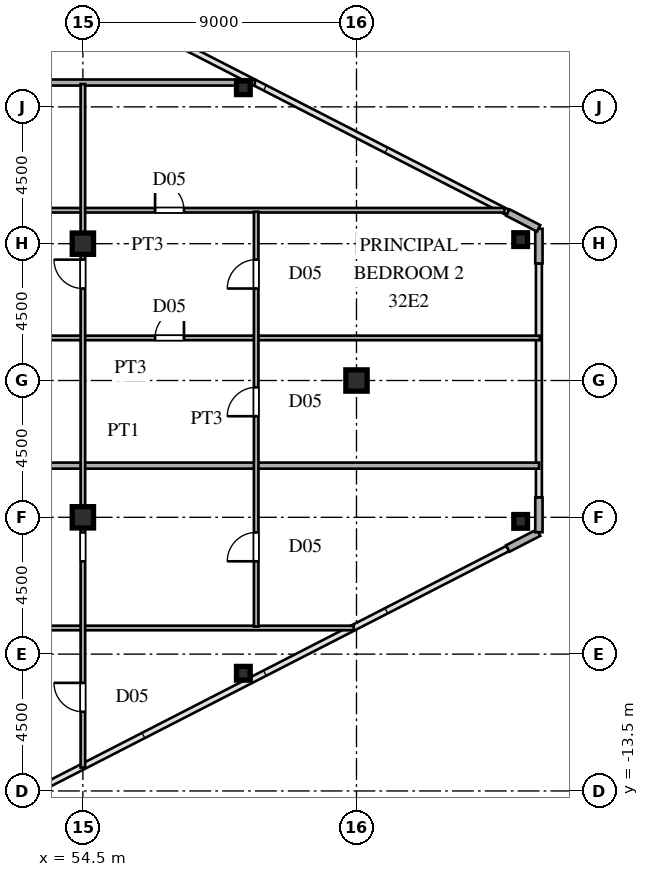
"""IFC4 building model, lengths in metres.
Left out: names, types, materials, properties, quantities, classifications, styles, units other than length and angle.
Written with IfcOpenShell. Run it as: python <this file> out.ifc"""

import sys

from ifc_helpers import new_model, si_unit, direction, frame, frame_2d, origin, origin_2d, place, context, subcontext, project, spatial, rectangle, hollow_rectangle, i_section, extrude, source, transform, mapped, element, fill, save


model = new_model("IFC4")
c1 = context("Model", 3, precision=1e-05, world=origin(), true_north=direction((0.0, 1.0)))
c2 = subcontext(c1, "Body", "Model", "MODEL_VIEW")
j1 = project(units=[si_unit("LENGTHUNIT", "METRE"), si_unit("PLANEANGLEUNIT", "RADIAN")], contexts=[c1])
p1 = place(None, origin())
s1 = spatial("IfcSite", under=j1, at=p1, CompositionType="ELEMENT")
p2 = place(p1, origin())
s2 = spatial("IfcBuilding", under=s1, at=p2, CompositionType="ELEMENT")
p3 = place(p2, frame((0.0, 0.0, 121.2)))
s3 = spatial("IfcBuildingStorey", under=s2, at=p3, CompositionType="ELEMENT", Elevation=121.2)
m1 = source(origin(), c2, "Body", "SweptSolid", [
    extrude(i_section(OverallWidth=0.7, OverallDepth=0.7, WebThickness=0.028, FlangeThickness=0.045, at=origin_2d()), origin(), (0.0, 0.0, 1.0), 3.6),
])
for number, where, z_axis, x_axis in (
    (1, (54.5, -4.5, 0.0), (0.0, 0.0, 1.0), (1.0, 0.0, 0.0)),
    (2, (54.5, 4.5, 0.0), (0.0, 0.0, 1.0), (1.0, 0.0, 0.0)),
    (3, (63.5, 0.0, 0.0), (0.0, 0.0, 1.0), (1.0, 0.0, 0.0)),
):
    element("IfcColumn", number, at=place(p3, frame(where, z_axis=z_axis, x_axis=x_axis)), inside=s3, PredefinedType="COLUMN", context=c2, shape_type="MappedRepresentation", body=[
        mapped(m1, transform((0.0, 0.0, 0.0), scale=1.0)),
    ])
m2 = source(origin(), c2, "Body", "SweptSolid", [
    extrude(hollow_rectangle(XDim=0.45, YDim=0.45, WallThickness=0.018, at=origin_2d()), origin(), (0.0, 0.0, 1.0), 3.6),
])
for number, where, z_axis, x_axis in (
    (4, (68.9, -4.634, 0.0), (0.0, 0.0, 1.0), (1.0, 0.0, 0.0)),
    (5, (68.9, 4.634, 0.0), (0.0, 0.0, 1.0), (1.0, 0.0, 0.0)),
    (6, (59.779, -9.629, 0.0), (0.0, 0.0, 1.0), (1.0, 0.0, 0.0)),
    (7, (59.779, 9.629, 0.0), (0.0, 0.0, 1.0), (1.0, 0.0, 0.0)),
):
    element("IfcColumn", number, at=place(p3, frame(where, z_axis=z_axis, x_axis=x_axis)), inside=s3, PredefinedType="COLUMN", context=c2, shape_type="MappedRepresentation", body=[
        mapped(m2, transform((0.0, 0.0, 0.0), scale=1.0)),
    ])
p4 = place(p3, frame((68.477, -5.525, 0.0), z_axis=(0.0, 0.0, 1.0), x_axis=(0.889797395748, 0.456355776255, 0.0)))
e8 = element("IfcWall", 8, at=p4, inside=s3, PredefinedType="SOLIDWALL", context=c2, shape_type="SweptSolid", body=[
    extrude(rectangle(XDim=1.14, YDim=0.24, at=frame_2d((0.57, 0.0))), origin(), (0.0, 0.0, 1.0), 3.38),
])
for number, where, z_axis, x_axis in (
    (9, (69.5, -4.99, 0.0), (0.0, 0.0, 1.0), (0.0, 1.0, 0.0)),
    (10, (69.5, 3.85, 0.0), (0.0, 0.0, 1.0), (0.0, 1.0, 0.0)),
):
    element("IfcWall", number, at=place(p3, frame(where, z_axis=z_axis, x_axis=x_axis)), inside=s3, PredefinedType="SOLIDWALL", context=c2, shape_type="SweptSolid", body=[
        extrude(rectangle(XDim=1.14, YDim=0.24, at=frame_2d((0.57, 0.0))), origin(), (0.0, 0.0, 1.0), 3.38),
    ])
p5 = place(p3, frame((69.491, 5.005, 0.0), z_axis=(0.0, 0.0, 1.0), x_axis=(-0.889797395748, 0.456355776255, 0.0)))
e11 = element("IfcWall", 11, at=p5, inside=s3, PredefinedType="SOLIDWALL", context=c2, shape_type="SweptSolid", body=[
    extrude(rectangle(XDim=1.14, YDim=0.24, at=frame_2d((0.57, 0.0))), origin(), (0.0, 0.0, 1.0), 3.38),
])
p6 = place(p3, frame((42.6, -8.14, 0.0), z_axis=(0.0, 0.0, 1.0), x_axis=(1.0, 0.0, 0.0)))
e12 = element("IfcWall", 12, at=p6, inside=s3, PredefinedType="PARTITIONING", context=c2, shape_type="SweptSolid", body=[
    extrude(rectangle(XDim=20.81, YDim=0.15, at=frame_2d((10.405, 0.0))), origin(), (0.0, 0.0, 1.0), 3.38),
])
p7 = place(p6, frame((2.462, 0.0, 0.0)))
e13 = element("IfcOpeningElement", 13, at=p7, cuts=e12, PredefinedType="OPENING", context=c2, shape_type="SweptSolid", body=[
    extrude(rectangle(XDim=0.95, YDim=2.15, at=frame_2d((0.475, 1.075))), frame((0.0, 0.085, 0.0), z_axis=(0.0, -1.0, 0.0), x_axis=(1.0, 0.0, 0.0)), (0.0, 0.0, 1.0), 0.17),
])
p8 = place(p6, frame((8.438, 0.0, 0.0)))
e14 = element("IfcOpeningElement", 14, at=p8, cuts=e12, PredefinedType="OPENING", context=c2, shape_type="SweptSolid", body=[
    extrude(rectangle(XDim=0.95, YDim=2.15, at=frame_2d((0.475, 1.075))), frame((0.0, 0.085, 0.0), z_axis=(0.0, -1.0, 0.0), x_axis=(1.0, 0.0, 0.0)), (0.0, 0.0, 1.0), 0.17),
])
p9 = place(p3, frame((39.88, -2.8, 0.0), z_axis=(0.0, 0.0, 1.0), x_axis=(1.0, 0.0, 0.0)))
e15 = element("IfcWall", 15, at=p9, inside=s3, PredefinedType="PARTITIONING", context=c2, shape_type="SweptSolid", body=[
    extrude(rectangle(XDim=29.625, YDim=0.2, at=frame_2d((14.812, 0.0))), origin(), (0.0, 0.0, 1.0), 3.38),
])
p10 = place(p3, frame((42.6, 1.4, 0.0), z_axis=(0.0, 0.0, 1.0), x_axis=(1.0, 0.0, 0.0)))
e16 = element("IfcWall", 16, at=p10, inside=s3, PredefinedType="PARTITIONING", context=c2, shape_type="SweptSolid", body=[
    extrude(rectangle(XDim=26.935, YDim=0.15, at=frame_2d((13.467, 0.0))), origin(), (0.0, 0.0, 1.0), 3.38),
])
p11 = place(p10, frame((5.45, 0.0, 0.0)))
e17 = element("IfcOpeningElement", 17, at=p11, cuts=e16, PredefinedType="OPENING", context=c2, shape_type="SweptSolid", body=[
    extrude(rectangle(XDim=0.95, YDim=2.15, at=frame_2d((0.475, 1.075))), frame((0.0, 0.085, 0.0), z_axis=(0.0, -1.0, 0.0), x_axis=(1.0, 0.0, 0.0)), (0.0, 0.0, 1.0), 0.17),
])
p12 = place(p10, frame((14.275, 0.0, 0.0)))
e18 = element("IfcOpeningElement", 18, at=p12, cuts=e16, PredefinedType="OPENING", context=c2, shape_type="SweptSolid", body=[
    extrude(rectangle(XDim=0.95, YDim=2.15, at=frame_2d((0.475, 1.075))), frame((0.0, 0.085, 0.0), z_axis=(0.0, -1.0, 0.0), x_axis=(1.0, 0.0, 0.0)), (0.0, 0.0, 1.0), 0.17),
])
p13 = place(p3, frame((42.6, 5.6, 0.0), z_axis=(0.0, 0.0, 1.0), x_axis=(1.0, 0.0, 0.0)))
e19 = element("IfcWall", 19, at=p13, inside=s3, PredefinedType="PARTITIONING", context=c2, shape_type="SweptSolid", body=[
    extrude(rectangle(XDim=25.766, YDim=0.15, at=frame_2d((12.883, 0.0))), origin(), (0.0, 0.0, 1.0), 3.38),
])
p14 = place(p13, frame((5.45, 0.0, 0.0)))
e20 = element("IfcOpeningElement", 20, at=p14, cuts=e19, PredefinedType="OPENING", context=c2, shape_type="SweptSolid", body=[
    extrude(rectangle(XDim=0.95, YDim=2.15, at=frame_2d((0.475, 1.075))), frame((0.0, 0.085, 0.0), z_axis=(0.0, -1.0, 0.0), x_axis=(1.0, 0.0, 0.0)), (0.0, 0.0, 1.0), 0.17),
])
p15 = place(p13, frame((14.275, 0.0, 0.0)))
e21 = element("IfcOpeningElement", 21, at=p15, cuts=e19, PredefinedType="OPENING", context=c2, shape_type="SweptSolid", body=[
    extrude(rectangle(XDim=0.95, YDim=2.15, at=frame_2d((0.475, 1.075))), frame((0.0, 0.085, 0.0), z_axis=(0.0, -1.0, 0.0), x_axis=(1.0, 0.0, 0.0)), (0.0, 0.0, 1.0), 0.17),
])
p16 = place(p3, frame((39.88, 9.8, 0.0), z_axis=(0.0, 0.0, 1.0), x_axis=(1.0, 0.0, 0.0)))
e22 = element("IfcWall", 22, at=p16, inside=s3, PredefinedType="PARTITIONING", context=c2, shape_type="SweptSolid", body=[
    extrude(rectangle(XDim=20.277, YDim=0.2, at=frame_2d((10.139, 0.0))), origin(), (0.0, 0.0, 1.0), 3.38),
])
p17 = place(p3, frame((54.5, -12.732, 0.0), z_axis=(0.0, 0.0, 1.0), x_axis=(0.0, 1.0, 0.0)))
e23 = element("IfcWall", 23, at=p17, inside=s3, PredefinedType="PARTITIONING", context=c2, shape_type="SweptSolid", body=[
    extrude(rectangle(XDim=22.482, YDim=0.15, at=frame_2d((11.241, 0.0))), origin(), (0.0, 0.0, 1.0), 2.78),
])
p18 = place(p17, frame((1.837, 0.0, 0.0)))
e24 = element("IfcOpeningElement", 24, at=p18, cuts=e23, PredefinedType="OPENING", context=c2, shape_type="SweptSolid", body=[
    extrude(rectangle(XDim=0.95, YDim=2.15, at=frame_2d((0.475, 1.075))), frame((0.0, 0.085, 0.0), z_axis=(0.0, -1.0, 0.0), x_axis=(1.0, 0.0, 0.0)), (0.0, 0.0, 1.0), 0.17),
])
p19 = place(p17, frame((6.785, 0.0, 0.0)))
e25 = element("IfcOpeningElement", 25, at=p19, cuts=e23, PredefinedType="OPENING", context=c2, shape_type="SweptSolid", body=[
    extrude(rectangle(XDim=0.95, YDim=2.15, at=frame_2d((0.475, 1.075))), frame((0.0, 0.085, 0.0), z_axis=(0.0, -1.0, 0.0), x_axis=(1.0, 0.0, 0.0)), (0.0, 0.0, 1.0), 0.17),
])
p20 = place(p17, frame((15.757, 0.0, 0.0)))
e26 = element("IfcOpeningElement", 26, at=p20, cuts=e23, PredefinedType="OPENING", context=c2, shape_type="SweptSolid", body=[
    extrude(rectangle(XDim=0.95, YDim=2.15, at=frame_2d((0.475, 1.075))), frame((0.0, 0.085, 0.0), z_axis=(0.0, -1.0, 0.0), x_axis=(1.0, 0.0, 0.0)), (0.0, 0.0, 1.0), 0.17),
])
p21 = place(p3, frame((60.2, -8.093, 0.0), z_axis=(0.0, 0.0, 1.0), x_axis=(0.0, 1.0, 0.0)))
e27 = element("IfcWall", 27, at=p21, inside=s3, PredefinedType="PARTITIONING", context=c2, shape_type="SweptSolid", body=[
    extrude(rectangle(XDim=13.643, YDim=0.15, at=frame_2d((6.822, 0.0))), origin(), (0.0, 0.0, 1.0), 3.38),
])
p22 = place(p21, frame((2.146, 0.0, 0.0)))
e28 = element("IfcOpeningElement", 28, at=p22, cuts=e27, PredefinedType="OPENING", context=c2, shape_type="SweptSolid", body=[
    extrude(rectangle(XDim=0.95, YDim=2.15, at=frame_2d((0.475, 1.075))), frame((0.0, 0.085, 0.0), z_axis=(0.0, -1.0, 0.0), x_axis=(1.0, 0.0, 0.0)), (0.0, 0.0, 1.0), 0.17),
])
p23 = place(p21, frame((6.918, 0.0, 0.0)))
e29 = element("IfcOpeningElement", 29, at=p23, cuts=e27, PredefinedType="OPENING", context=c2, shape_type="SweptSolid", body=[
    extrude(rectangle(XDim=0.95, YDim=2.15, at=frame_2d((0.475, 1.075))), frame((0.0, 0.085, 0.0), z_axis=(0.0, -1.0, 0.0), x_axis=(1.0, 0.0, 0.0)), (0.0, 0.0, 1.0), 0.17),
])
p24 = place(p21, frame((11.118, 0.0, 0.0)))
e30 = element("IfcOpeningElement", 30, at=p24, cuts=e27, PredefinedType="OPENING", context=c2, shape_type="SweptSolid", body=[
    extrude(rectangle(XDim=0.95, YDim=2.15, at=frame_2d((0.475, 1.075))), frame((0.0, 0.085, 0.0), z_axis=(0.0, -1.0, 0.0), x_axis=(1.0, 0.0, 0.0)), (0.0, 0.0, 1.0), 0.17),
])
m3 = source(origin(), c2, "Body", "SweptSolid", [
    extrude(rectangle(XDim=0.95, YDim=2.15, at=frame_2d((0.475, 1.075))), frame((0.0, 0.025, 0.0), z_axis=(0.0, -1.0, 0.0), x_axis=(1.0, 0.0, 0.0)), (0.0, 0.0, 1.0), 0.05),
])
p25 = place(p12, origin())
e31 = element("IfcDoor", 31, at=p25, inside=s3, OperationType="SINGLE_SWING_RIGHT", PredefinedType="DOOR", context=c2, shape_type="MappedRepresentation", body=[
    mapped(m3, transform((0.0, 0.0, 0.0), scale=1.0)),
])
fill(e18, e31)
p26 = place(p15, origin())
e32 = element("IfcDoor", 32, at=p26, inside=s3, OperationType="SINGLE_SWING_LEFT", PredefinedType="DOOR", context=c2, shape_type="MappedRepresentation", body=[
    mapped(m3, transform((0.0, 0.0, 0.0), scale=1.0)),
])
fill(e21, e32)
p27 = place(p18, origin())
e33 = element("IfcDoor", 33, at=p27, inside=s3, OperationType="SINGLE_SWING_RIGHT", PredefinedType="DOOR", context=c2, shape_type="MappedRepresentation", body=[
    mapped(m3, transform((0.0, 0.0, 0.0), scale=1.0)),
])
fill(e24, e33)
p28 = place(p20, origin())
e34 = element("IfcDoor", 34, at=p28, inside=s3, OperationType="SINGLE_SWING_RIGHT", PredefinedType="DOOR", context=c2, shape_type="MappedRepresentation", body=[
    mapped(m3, transform((0.0, 0.0, 0.0), scale=1.0)),
])
fill(e26, e34)
p29 = place(p22, origin())
e35 = element("IfcDoor", 35, at=p29, inside=s3, OperationType="SINGLE_SWING_LEFT", PredefinedType="DOOR", context=c2, shape_type="MappedRepresentation", body=[
    mapped(m3, transform((0.0, 0.0, 0.0), scale=1.0)),
])
fill(e28, e35)
p30 = place(p23, origin())
e36 = element("IfcDoor", 36, at=p30, inside=s3, OperationType="SINGLE_SWING_LEFT", PredefinedType="DOOR", context=c2, shape_type="MappedRepresentation", body=[
    mapped(m3, transform((0.0, 0.0, 0.0), scale=1.0)),
])
fill(e29, e36)
p31 = place(p24, origin())
e37 = element("IfcDoor", 37, at=p31, inside=s3, OperationType="SINGLE_SWING_LEFT", PredefinedType="DOOR", context=c2, shape_type="MappedRepresentation", body=[
    mapped(m3, transform((0.0, 0.0, 0.0), scale=1.0)),
])
fill(e30, e37)
save(model, sys.argv[1])
